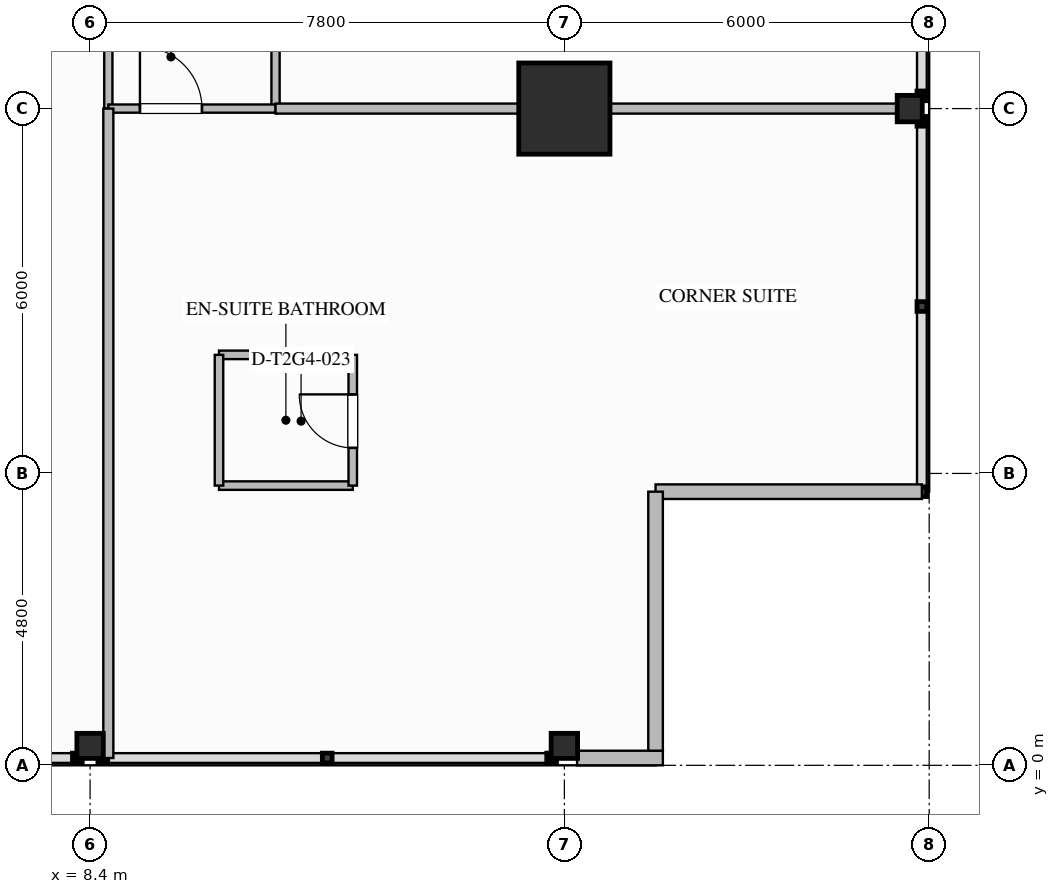
"""IFC4 building model, lengths in metres.
Left out: names, types, materials, properties, quantities, classifications, styles, units other than length and angle.
Written with IfcOpenShell. Run it as: python <this file> out.ifc"""

import sys

from ifc_helpers import new_model, si_unit, direction, frame, frame_2d, origin, origin_2d, place, context, subcontext, project, spatial, rectangle, i_section, extrude, element, fill, save


model = new_model("IFC4")
c1 = context("Model", 3, precision=1e-05, world=origin(), true_north=direction((0.0, 1.0)))
c2 = subcontext(c1, "Body", "Model", "MODEL_VIEW")
j1 = project(units=[si_unit("LENGTHUNIT", "METRE"), si_unit("PLANEANGLEUNIT", "RADIAN")], contexts=[c1])
p1 = place(None, origin())
s1 = spatial("IfcSite", under=j1, at=p1, CompositionType="ELEMENT")
p2 = place(p1, origin())
s2 = spatial("IfcBuilding", under=s1, at=p2, CompositionType="ELEMENT")
p3 = place(p2, frame((0.0, 0.0, 123.3)))
s3 = spatial("IfcBuildingStorey", under=s2, at=p3, CompositionType="ELEMENT", Elevation=123.3)
p4 = place(p3, frame((16.2, 10.8, 0.0), z_axis=(0.0, 0.0, 1.0), x_axis=(1.0, 0.0, 0.0)))
e1 = element("IfcColumn", 1, at=p4, inside=s3, PredefinedType="COLUMN", context=c2, shape_type="SweptSolid", body=[
    extrude(rectangle(XDim=1.5, YDim=1.5, at=origin_2d()), origin(), (0.0, 0.0, 1.0), 3.5),
])
for number, where, z_axis, x_axis in (
    (2, (21.88, 10.8, 0.0), (0.0, 0.0, 1.0), (1.0, 0.0, 0.0)),
    (3, (8.4, 0.32, 0.0), (0.0, 0.0, 1.0), (0.0, 1.0, 0.0)),
    (4, (16.2, 0.32, 0.0), (0.0, 0.0, 1.0), (0.0, 1.0, 0.0)),
):
    element("IfcColumn", number, at=place(p3, frame(where, z_axis=z_axis, x_axis=x_axis)), inside=s3, PredefinedType="COLUMN", context=c2, shape_type="SweptSolid", body=[
        extrude(i_section(OverallWidth=0.412, OverallDepth=0.435, WebThickness=0.036, FlangeThickness=0.057, FilletRadius=0.028, at=origin_2d()), origin(), (0.0, 0.0, 1.0), 3.497),
    ])
p5 = place(p3, frame((17.82, 0.12, 0.0), z_axis=(0.0, 0.0, 1.0), x_axis=(-1.0, 0.0, 0.0)))
e5 = element("IfcWall", 5, at=p5, inside=s3, PredefinedType="STANDARD", context=c2, shape_type="SweptSolid", body=[
    extrude(rectangle(XDim=1.411, YDim=0.24, at=frame_2d((0.705, 0.0))), origin(), (0.0, 0.0, 1.0), 3.24),
])
p6 = place(p3, frame((22.08, 4.5, 0.0), z_axis=(0.0, 0.0, 1.0), x_axis=(-1.0, 0.0, 0.0)))
e6 = element("IfcWall", 6, at=p6, inside=s3, PredefinedType="STANDARD", context=c2, shape_type="SweptSolid", body=[
    extrude(rectangle(XDim=4.38, YDim=0.24, at=frame_2d((2.19, 0.0))), origin(), (0.0, 0.0, 1.0), 3.24),
])
p7 = place(p3, frame((17.7, 4.5, 0.0), z_axis=(0.0, 0.0, 1.0), x_axis=(0.0, -1.0, 0.0)))
e7 = element("IfcWall", 7, at=p7, inside=s3, PredefinedType="STANDARD", context=c2, shape_type="SweptSolid", body=[
    extrude(rectangle(XDim=4.26, YDim=0.24, at=frame_2d((2.13, 0.0))), origin(), (0.0, 0.0, 1.0), 3.24),
])
p8 = place(p3, frame((8.7, 10.8, 0.0), z_axis=(0.0, 0.0, 1.0), x_axis=(0.0, 1.0, 0.0)))
e8 = element("IfcWall", 8, at=p8, inside=s3, PredefinedType="PARTITIONING", context=c2, shape_type="SweptSolid", body=[
    extrude(rectangle(XDim=4.55, YDim=0.135, at=frame_2d((2.275, 0.0))), origin(), (0.0, 0.0, 1.0), 3.24),
])
p9 = place(p3, frame((11.45, 10.8, 0.0), z_axis=(0.0, 0.0, 1.0), x_axis=(0.0, 1.0, 0.0)))
e9 = element("IfcWall", 9, at=p9, inside=s3, PredefinedType="PARTITIONING", context=c2, shape_type="SweptSolid", body=[
    extrude(rectangle(XDim=32.4, YDim=0.135, at=frame_2d((16.2, 0.0))), origin(), (0.0, 0.0, 1.0), 3.24),
])
p10 = place(p9, frame((1.963, 0.0, 0.0)))
e10 = element("IfcOpeningElement", 10, at=p10, cuts=e9, PredefinedType="OPENING", context=c2, shape_type="SweptSolid", body=[
    extrude(rectangle(XDim=0.96, YDim=2.15, at=frame_2d((0.48, 1.075))), frame((0.0, 0.077, 0.0), z_axis=(0.0, -1.0, 0.0), x_axis=(1.0, 0.0, 0.0)), (0.0, 0.0, 1.0), 0.155),
])
p11 = place(p9, frame((8.234, 0.0, 0.0)))
e11 = element("IfcOpeningElement", 11, at=p11, cuts=e9, PredefinedType="OPENING", context=c2, shape_type="SweptSolid", body=[
    extrude(rectangle(XDim=0.96, YDim=2.15, at=frame_2d((0.48, 1.075))), frame((0.0, 0.077, 0.0), z_axis=(0.0, -1.0, 0.0), x_axis=(1.0, 0.0, 0.0)), (0.0, 0.0, 1.0), 0.155),
])
p12 = place(p9, frame((14.244, 0.0, 0.0)))
e12 = element("IfcOpeningElement", 12, at=p12, cuts=e9, PredefinedType="OPENING", context=c2, shape_type="SweptSolid", body=[
    extrude(rectangle(XDim=0.96, YDim=2.15, at=frame_2d((0.48, 1.075))), frame((0.0, 0.077, 0.0), z_axis=(0.0, -1.0, 0.0), x_axis=(1.0, 0.0, 0.0)), (0.0, 0.0, 1.0), 0.155),
])
p13 = place(p9, frame((20.253, 0.0, 0.0)))
e13 = element("IfcOpeningElement", 13, at=p13, cuts=e9, PredefinedType="OPENING", context=c2, shape_type="SweptSolid", body=[
    extrude(rectangle(XDim=0.96, YDim=2.15, at=frame_2d((0.48, 1.075))), frame((0.0, 0.077, 0.0), z_axis=(0.0, -1.0, 0.0), x_axis=(1.0, 0.0, 0.0)), (0.0, 0.0, 1.0), 0.155),
])
p14 = place(p9, frame((26.636, 0.0, 0.0)))
e14 = element("IfcOpeningElement", 14, at=p14, cuts=e9, PredefinedType="OPENING", context=c2, shape_type="SweptSolid", body=[
    extrude(rectangle(XDim=1.26, YDim=2.2, at=frame_2d((0.63, 1.1))), frame((0.0, 0.077, 0.0), z_axis=(0.0, -1.0, 0.0), x_axis=(1.0, 0.0, 0.0)), (0.0, 0.0, 1.0), 0.155),
])
p15 = place(p3, frame((8.7, 10.8, 0.0), z_axis=(0.0, 0.0, 1.0), x_axis=(1.0, 0.0, 0.0)))
e15 = element("IfcWall", 15, at=p15, inside=s3, PredefinedType="PARTITIONING", context=c2, shape_type="SweptSolid", body=[
    extrude(rectangle(XDim=2.75, YDim=0.135, at=frame_2d((1.375, 0.0))), origin(), (0.0, 0.0, 1.0), 2.53),
])
p16 = place(p15, frame((0.52, 0.0, 0.0)))
e16 = element("IfcOpeningElement", 16, at=p16, cuts=e15, PredefinedType="OPENING", context=c2, shape_type="SweptSolid", body=[
    extrude(rectangle(XDim=1.02, YDim=2.15, at=frame_2d((0.51, 1.075))), frame((0.0, 0.077, 0.0), z_axis=(0.0, -1.0, 0.0), x_axis=(1.0, 0.0, 0.0)), (0.0, 0.0, 1.0), 0.155),
])
p17 = place(p3, frame((8.7, 0.12, 0.0), z_axis=(0.0, 0.0, 1.0), x_axis=(0.0, 1.0, 0.0)))
e17 = element("IfcWall", 17, at=p17, inside=s3, PredefinedType="PARTITIONING", context=c2, shape_type="SweptSolid", body=[
    extrude(rectangle(XDim=10.68, YDim=0.165, at=frame_2d((5.34, 0.0))), origin(), (0.0, 0.0, 1.0), 2.53),
])
p18 = place(p3, frame((11.45, 10.8, 0.0), z_axis=(0.0, 0.0, 1.0), x_axis=(1.0, 0.0, 0.0)))
e18 = element("IfcWall", 18, at=p18, inside=s3, PredefinedType="PARTITIONING", context=c2, shape_type="SweptSolid", body=[
    extrude(rectangle(XDim=10.63, YDim=0.165, at=frame_2d((5.315, 0.0))), origin(), (0.0, 0.0, 1.0), 2.53),
])
for number, where, z_axis, x_axis in (
    (19, (10.52, 4.6, 0.0), (0.0, 0.0, 1.0), (1.0, 0.0, 0.0)),
    (20, (10.52, 6.75, 0.0), (0.0, 0.0, 1.0), (1.0, 0.0, 0.0)),
):
    element("IfcWall", number, at=place(p3, frame(where, z_axis=z_axis, x_axis=x_axis)), inside=s3, PredefinedType="PLUMBINGWALL", context=c2, shape_type="SweptSolid", body=[
        extrude(rectangle(XDim=2.2, YDim=0.14, at=frame_2d((1.1, 0.0))), origin(), (0.0, 0.0, 1.0), 3.24),
    ])
p19 = place(p3, frame((10.52, 4.6, 0.0), z_axis=(0.0, 0.0, 1.0), x_axis=(0.0, 1.0, 0.0)))
e21 = element("IfcWall", 21, at=p19, inside=s3, PredefinedType="PLUMBINGWALL", context=c2, shape_type="SweptSolid", body=[
    extrude(rectangle(XDim=2.15, YDim=0.14, at=frame_2d((1.075, 0.0))), origin(), (0.0, 0.0, 1.0), 3.24),
])
p20 = place(p3, frame((12.72, 4.6, 0.0), z_axis=(0.0, 0.0, 1.0), x_axis=(0.0, 1.0, 0.0)))
e22 = element("IfcWall", 22, at=p20, inside=s3, PredefinedType="PLUMBINGWALL", context=c2, shape_type="SweptSolid", body=[
    extrude(rectangle(XDim=2.15, YDim=0.14, at=frame_2d((1.075, 0.0))), origin(), (0.0, 0.0, 1.0), 3.24),
])
p21 = place(p20, frame((0.62, 0.0, 0.0)))
e23 = element("IfcOpeningElement", 23, at=p21, cuts=e22, PredefinedType="OPENING", context=c2, shape_type="SweptSolid", body=[
    extrude(rectangle(XDim=0.88, YDim=2.1, at=frame_2d((0.44, 1.05))), frame((0.0, 0.08, 0.0), z_axis=(0.0, -1.0, 0.0), x_axis=(1.0, 0.0, 0.0)), (0.0, 0.0, 1.0), 0.16),
])
p22 = place(p21, origin())
e24 = element("IfcDoor", 24, at=p22, inside=s3, OperationType="SINGLE_SWING_RIGHT", PredefinedType="DOOR", context=c2, shape_type="SweptSolid", body=[
    extrude(rectangle(XDim=0.88, YDim=2.1, at=frame_2d((0.44, 1.05))), frame((0.0, 0.025, 0.0), z_axis=(0.0, -1.0, 0.0), x_axis=(1.0, 0.0, 0.0)), (0.0, 0.0, 1.0), 0.05),
])
fill(e23, e24)
p23 = place(p16, origin())
e25 = element("IfcDoor", 25, at=p23, inside=s3, OperationType="SINGLE_SWING_LEFT", PredefinedType="DOOR", context=c2, shape_type="SweptSolid", body=[
    extrude(rectangle(XDim=1.02, YDim=2.15, at=frame_2d((0.51, 1.075))), frame((0.0, 0.025, 0.0), z_axis=(0.0, -1.0, 0.0), x_axis=(1.0, 0.0, 0.0)), (0.0, 0.0, 1.0), 0.05),
])
fill(e16, e25)
save(model, sys.argv[1])
